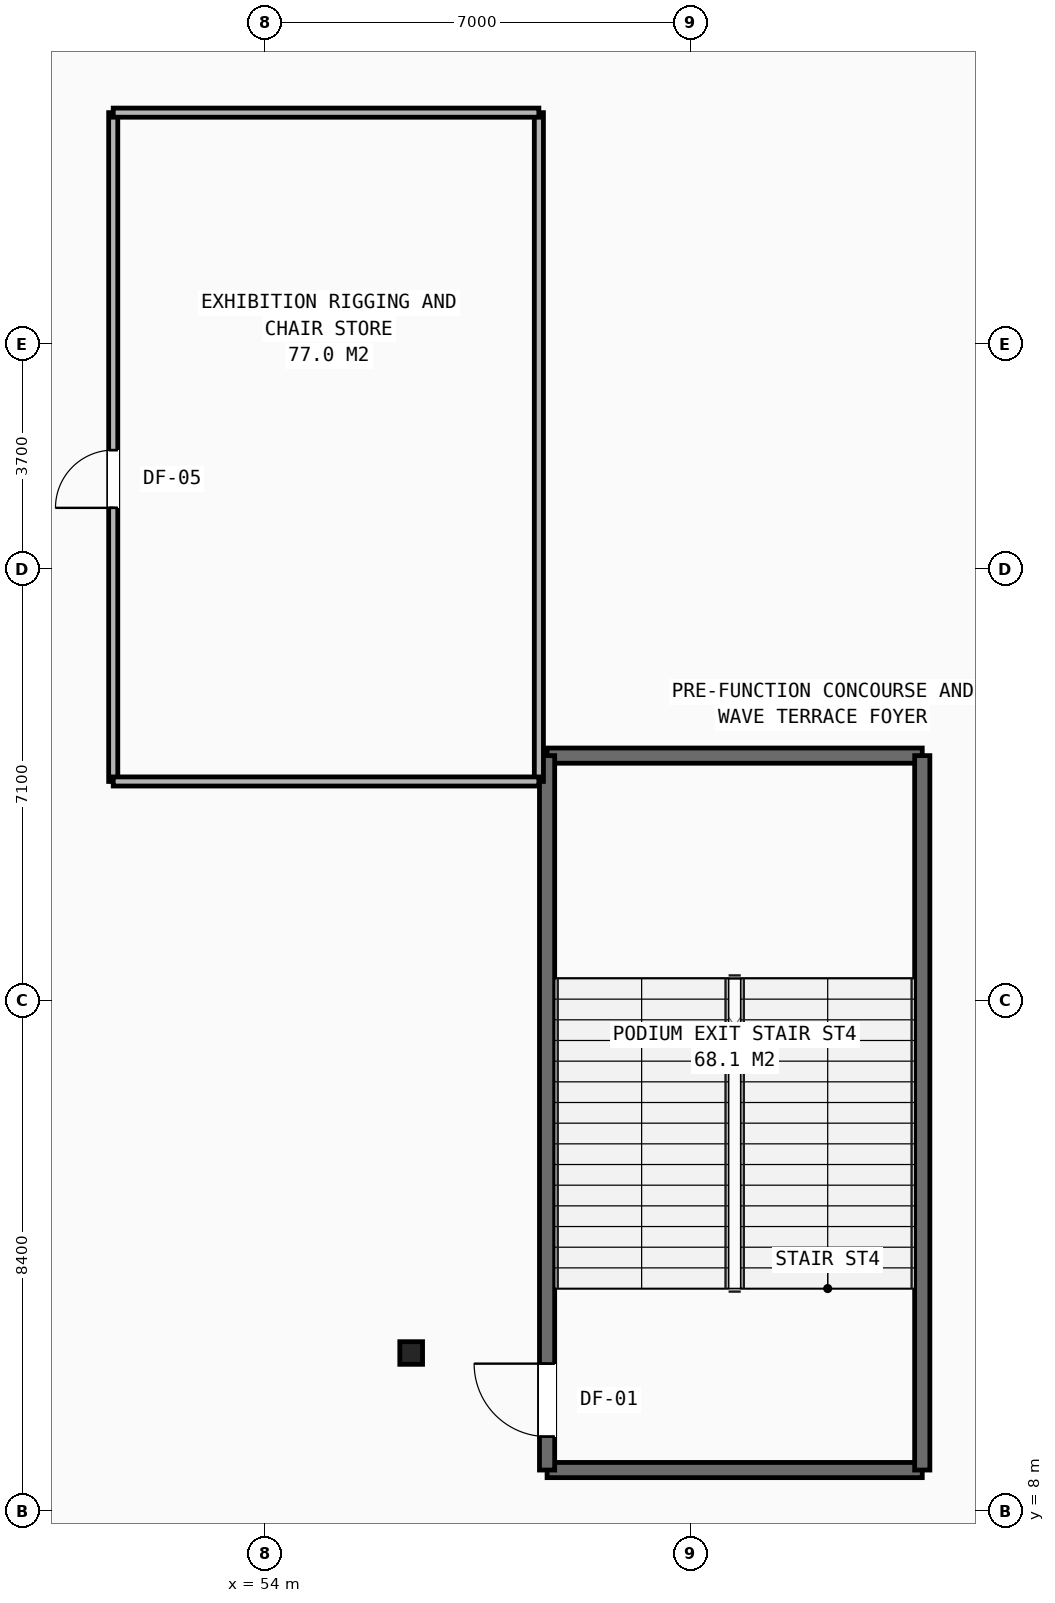
"""IFC4 building model, lengths in metres.
Left out: names, types, materials, properties, quantities, classifications, styles, units other than length and angle.
Written with IfcOpenShell. Run it as: python <this file> out.ifc"""

import sys

from ifc_helpers import new_model, si_unit, direction, frame, frame_2d, origin, origin_2d, place, context, subcontext, project, spatial, rectangle, i_section, extrude, element, fill, save


model = new_model("IFC4")
c1 = context("Model", 3, precision=1e-05, world=origin(), true_north=direction((0.0, 1.0)))
c2 = subcontext(c1, "Body", "Model", "MODEL_VIEW")
j1 = project(units=[si_unit("LENGTHUNIT", "METRE"), si_unit("PLANEANGLEUNIT", "RADIAN")], contexts=[c1])
p1 = place(None, origin())
s1 = spatial("IfcSite", under=j1, at=p1, CompositionType="ELEMENT")
p2 = place(p1, origin())
s2 = spatial("IfcBuilding", under=s1, at=p2, CompositionType="ELEMENT")
p3 = place(p2, frame((0.0, 0.0, 11.0)))
s3 = spatial("IfcBuildingStorey", under=s2, at=p3, CompositionType="ELEMENT", Elevation=11.0)
p4 = place(p3, frame((56.4, 10.6, 0.0), z_axis=(0.0, 0.0, 1.0), x_axis=(1.0, 0.0, 0.0)))
e1 = element("IfcColumn", 1, at=p4, inside=s3, PredefinedType="COLUMN", context=c2, shape_type="SweptSolid", body=[
    extrude(i_section(OverallWidth=0.374, OverallDepth=0.372, WebThickness=0.016, FlangeThickness=0.026, at=origin_2d()), origin(), (0.0, 0.0, 1.0), 5.5),
])
for number, where, z_axis, x_axis in (
    (2, (58.635, 20.425, 0.0), (0.0, 0.0, 1.0), (1.0, 0.0, 0.0)),
    (3, (58.635, 8.675, 0.0), (0.0, 0.0, 1.0), (1.0, 0.0, 0.0)),
):
    element("IfcWall", number, at=place(p3, frame(where, z_axis=z_axis, x_axis=x_axis)), inside=s3, PredefinedType="SHEAR", context=c2, shape_type="SweptSolid", body=[
        extrude(rectangle(XDim=6.17, YDim=0.25, at=frame_2d((3.085, 0.0))), origin(), (0.0, 0.0, 1.0), 5.18),
    ])
p5 = place(p3, frame((58.635, 8.675, 0.0), z_axis=(0.0, 0.0, 1.0), x_axis=(0.0, 1.0, 0.0)))
e4 = element("IfcWall", 4, at=p5, inside=s3, PredefinedType="SHEAR", context=c2, shape_type="SweptSolid", body=[
    extrude(rectangle(XDim=11.75, YDim=0.25, at=frame_2d((5.875, 0.0))), origin(), (0.0, 0.0, 1.0), 5.18),
])
p6 = place(p5, frame((0.55, 0.0, 0.0)))
e5 = element("IfcOpeningElement", 5, at=p6, cuts=e4, PredefinedType="OPENING", context=c2, shape_type="SweptSolid", body=[
    extrude(rectangle(XDim=1.2, YDim=2.15, at=frame_2d((0.6, 1.075))), frame((0.0, 0.135, 0.0), z_axis=(0.0, -1.0, 0.0), x_axis=(1.0, 0.0, 0.0)), (0.0, 0.0, 1.0), 0.27),
])
p7 = place(p3, frame((64.805, 8.675, 0.0), z_axis=(0.0, 0.0, 1.0), x_axis=(0.0, 1.0, 0.0)))
e6 = element("IfcWall", 6, at=p7, inside=s3, PredefinedType="SHEAR", context=c2, shape_type="SweptSolid", body=[
    extrude(rectangle(XDim=11.75, YDim=0.25, at=frame_2d((5.875, 0.0))), origin(), (0.0, 0.0, 1.0), 5.18),
])
p8 = place(p3, frame((51.5, 20.0, 0.0), z_axis=(0.0, 0.0, 1.0), x_axis=(0.0, 1.0, 0.0)))
e7 = element("IfcWall", 7, at=p8, inside=s3, PredefinedType="PARTITIONING", context=c2, shape_type="SweptSolid", body=[
    extrude(rectangle(XDim=11.0, YDim=0.15, at=frame_2d((5.5, 0.0))), origin(), (0.0, 0.0, 1.0), 5.18),
])
p9 = place(p8, frame((4.5, 0.0, 0.0)))
e8 = element("IfcOpeningElement", 8, at=p9, cuts=e7, PredefinedType="OPENING", context=c2, shape_type="SweptSolid", body=[
    extrude(rectangle(XDim=0.95, YDim=2.1, at=frame_2d((0.475, 1.05))), frame((0.0, 0.085, 0.0), z_axis=(0.0, -1.0, 0.0), x_axis=(1.0, 0.0, 0.0)), (0.0, 0.0, 1.0), 0.17),
])
p10 = place(p3, frame((58.5, 20.0, 0.0), z_axis=(0.0, 0.0, 1.0), x_axis=(0.0, 1.0, 0.0)))
e9 = element("IfcWall", 9, at=p10, inside=s3, PredefinedType="PARTITIONING", context=c2, shape_type="SweptSolid", body=[
    extrude(rectangle(XDim=11.0, YDim=0.15, at=frame_2d((5.5, 0.0))), origin(), (0.0, 0.0, 1.0), 5.18),
])
for number, where, z_axis, x_axis in (
    (10, (51.5, 20.0, 0.0), (0.0, 0.0, 1.0), (1.0, 0.0, 0.0)),
    (11, (51.5, 31.0, 0.0), (0.0, 0.0, 1.0), (1.0, 0.0, 0.0)),
):
    element("IfcWall", number, at=place(p3, frame(where, z_axis=z_axis, x_axis=x_axis)), inside=s3, PredefinedType="PARTITIONING", context=c2, shape_type="SweptSolid", body=[
        extrude(rectangle(XDim=7.0, YDim=0.15, at=frame_2d((3.5, 0.0))), origin(), (0.0, 0.0, 1.0), 5.18),
    ])
p11 = place(p9, origin())
e12 = element("IfcDoor", 12, at=p11, inside=s3, OperationType="SINGLE_SWING_LEFT", PredefinedType="DOOR", context=c2, shape_type="SweptSolid", body=[
    extrude(rectangle(XDim=0.95, YDim=2.1, at=frame_2d((0.475, 1.05))), frame((0.0, 0.025, 0.0), z_axis=(0.0, -1.0, 0.0), x_axis=(1.0, 0.0, 0.0)), (0.0, 0.0, 1.0), 0.05),
])
fill(e8, e12)
p12 = place(p6, origin())
e13 = element("IfcDoor", 13, at=p12, inside=s3, OperationType="SINGLE_SWING_RIGHT", PredefinedType="DOOR", context=c2, shape_type="SweptSolid", body=[
    extrude(rectangle(XDim=1.2, YDim=2.15, at=frame_2d((0.6, 1.075))), frame((0.0, 0.025, 0.0), z_axis=(0.0, -1.0, 0.0), x_axis=(1.0, 0.0, 0.0)), (0.0, 0.0, 1.0), 0.05),
])
fill(e5, e13)
save(model, sys.argv[1])
